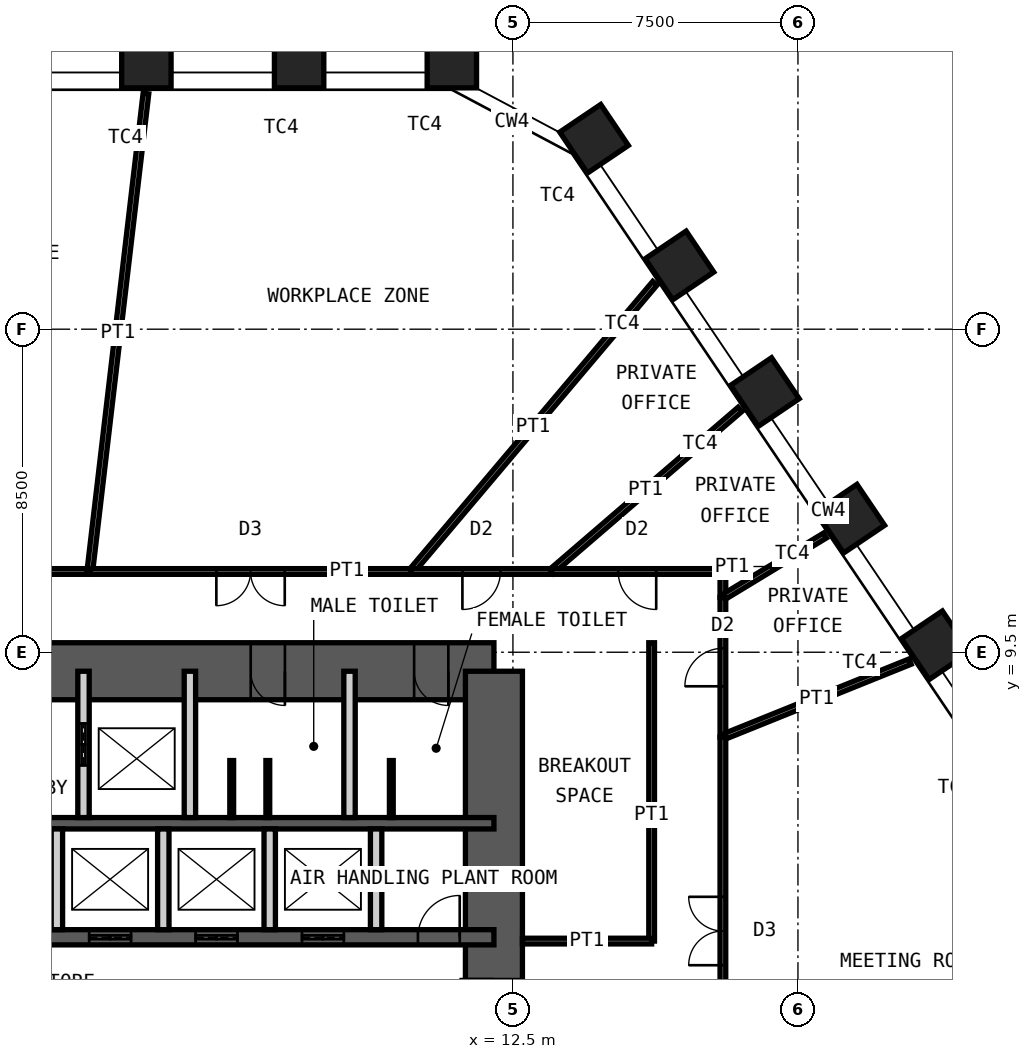
"""IFC4 building model, lengths in metres.
Left out: names, types, materials, properties, quantities, classifications, styles, units other than length and angle.
Written with IfcOpenShell. Run it as: python <this file> out.ifc"""

import sys

from ifc_helpers import new_model, si_unit, direction, frame, frame_2d, origin, origin_2d, place, context, subcontext, project, spatial, rectangle, hollow_rectangle, extrude, element, fill, save


model = new_model("IFC4")
c1 = context("Model", 3, precision=1e-05, world=origin(), true_north=direction((0.0, 1.0)))
c2 = subcontext(c1, "Body", "Model", "MODEL_VIEW")
j1 = project(units=[si_unit("LENGTHUNIT", "METRE"), si_unit("PLANEANGLEUNIT", "RADIAN")], contexts=[c1])
p1 = place(None, origin())
s1 = spatial("IfcSite", under=j1, at=p1, CompositionType="ELEMENT")
p2 = place(p1, origin())
s2 = spatial("IfcBuilding", under=s1, at=p2, CompositionType="ELEMENT")
p3 = place(p2, frame((0.0, 0.0, 153.4)))
s3 = spatial("IfcBuildingStorey", under=s2, at=p3, CompositionType="ELEMENT", Elevation=153.4)
for number, where, z_axis, x_axis in (
    (1, (2.854, 25.0, 0.0), (0.0, 0.0, 1.0), (-1.0, 0.0, 0.0)),
    (2, (6.874, 25.0, 0.0), (0.0, 0.0, 1.0), (-1.0, 0.0, 0.0)),
    (3, (10.893, 25.0, 0.0), (0.0, 0.0, 1.0), (-1.0, 0.0, 0.0)),
    (4, (14.635, 23.01, 0.0), (0.0, 0.0, 1.0), (-0.559, 0.829, 0.0)),
    (5, (16.882, 19.678, 0.0), (0.0, 0.0, 1.0), (-0.559, 0.829, 0.0)),
    (6, (19.13, 16.346, 0.0), (0.0, 0.0, 1.0), (-0.559, 0.829, 0.0)),
    (7, (21.377, 13.014, 0.0), (0.0, 0.0, 1.0), (-0.559, 0.829, 0.0)),
    (8, (23.625, 9.682, 0.0), (0.0, 0.0, 1.0), (-0.559, 0.829, 0.0)),
):
    element("IfcColumn", number, at=place(p3, frame(where, z_axis=z_axis, x_axis=x_axis)), inside=s3, PredefinedType="COLUMN", context=c2, shape_type="SweptSolid", body=[
        extrude(hollow_rectangle(XDim=1.3, YDim=1.3, WallThickness=0.1, at=origin_2d()), origin(), (0.0, 0.0, 1.0), 4.2),
    ])
p4 = place(p3, frame((-12.0, 9.0, 0.0), z_axis=(0.0, 0.0, 1.0), x_axis=(1.0, 0.0, 0.0)))
e9 = element("IfcWall", 9, at=p4, inside=s3, PredefinedType="SHEAR", context=c2, shape_type="SweptSolid", body=[
    extrude(rectangle(XDim=24.0, YDim=1.5, at=frame_2d((12.0, 0.0))), origin(), (0.0, 0.0, 1.0), 4.2),
])
p5 = place(p4, frame((10.4, 0.0, 0.0)))
e10 = element("IfcOpeningElement", 10, at=p5, cuts=e9, PredefinedType="OPENING", context=c2, shape_type="SweptSolid", body=[
    extrude(rectangle(XDim=1.0, YDim=2.1, at=frame_2d((0.5, 1.05))), frame((0.0, 0.76, 0.0), z_axis=(0.0, -1.0, 0.0), x_axis=(1.0, 0.0, 0.0)), (0.0, 0.0, 1.0), 1.52),
])
p6 = place(p4, frame((17.6, 0.0, 0.0)))
e11 = element("IfcOpeningElement", 11, at=p6, cuts=e9, PredefinedType="OPENING", context=c2, shape_type="SweptSolid", body=[
    extrude(rectangle(XDim=0.9, YDim=2.1, at=frame_2d((0.45, 1.05))), frame((0.0, 0.76, 0.0), z_axis=(0.0, -1.0, 0.0), x_axis=(1.0, 0.0, 0.0)), (0.0, 0.0, 1.0), 1.52),
])
p7 = place(p4, frame((21.9, 0.0, 0.0)))
e12 = element("IfcOpeningElement", 12, at=p7, cuts=e9, PredefinedType="OPENING", context=c2, shape_type="SweptSolid", body=[
    extrude(rectangle(XDim=0.9, YDim=2.1, at=frame_2d((0.45, 1.05))), frame((0.0, 0.76, 0.0), z_axis=(0.0, -1.0, 0.0), x_axis=(1.0, 0.0, 0.0)), (0.0, 0.0, 1.0), 1.52),
])
p8 = place(p3, frame((12.0, -9.0, 0.0), z_axis=(0.0, 0.0, 1.0), x_axis=(0.0, 1.0, 0.0)))
e13 = element("IfcWall", 13, at=p8, inside=s3, PredefinedType="SHEAR", context=c2, shape_type="SweptSolid", body=[
    extrude(rectangle(XDim=18.0, YDim=1.5, at=frame_2d((9.0, 0.0))), origin(), (0.0, 0.0, 1.0), 4.2),
])
p9 = place(p8, frame((8.1, 0.0, 0.0)))
e14 = element("IfcOpeningElement", 14, at=p9, cuts=e13, PredefinedType="OPENING", context=c2, shape_type="SweptSolid", body=[
    extrude(rectangle(XDim=1.8, YDim=2.1, at=frame_2d((0.9, 1.05))), frame((0.0, 0.76, 0.0), z_axis=(0.0, -1.0, 0.0), x_axis=(1.0, 0.0, 0.0)), (0.0, 0.0, 1.0), 1.52),
])
p10 = place(p3, frame((-12.0, 5.0, 0.0), z_axis=(0.0, 0.0, 1.0), x_axis=(1.0, 0.0, 0.0)))
e15 = element("IfcWall", 15, at=p10, inside=s3, PredefinedType="SHEAR", context=c2, shape_type="SweptSolid", body=[
    extrude(rectangle(XDim=24.0, YDim=0.3, at=frame_2d((12.0, 0.0))), origin(), (0.0, 0.0, 1.0), 4.2),
])
p11 = place(p3, frame((-12.0, 2.0, 0.0), z_axis=(0.0, 0.0, 1.0), x_axis=(1.0, 0.0, 0.0)))
e16 = element("IfcWall", 16, at=p11, inside=s3, PredefinedType="SHEAR", context=c2, shape_type="SweptSolid", body=[
    extrude(rectangle(XDim=24.0, YDim=0.4, at=frame_2d((12.0, 0.0))), origin(), (0.0, 0.0, 1.0), 4.2),
])
p12 = place(p11, frame((2.4, 0.0, 0.0)))
e17 = element("IfcOpeningElement", 17, at=p12, cuts=e16, PredefinedType="OPENING", context=c2, shape_type="SweptSolid", body=[
    extrude(rectangle(XDim=1.1, YDim=2.1, at=frame_2d((0.55, 1.05))), frame((0.0, 0.21, 0.0), z_axis=(0.0, -1.0, 0.0), x_axis=(1.0, 0.0, 0.0)), (0.0, 0.0, 1.0), 0.42),
])
p13 = place(p11, frame((22.0, 0.0, 0.0)))
e18 = element("IfcOpeningElement", 18, at=p13, cuts=e16, PredefinedType="OPENING", context=c2, shape_type="SweptSolid", body=[
    extrude(rectangle(XDim=1.1, YDim=2.1, at=frame_2d((0.55, 1.05))), frame((0.0, 0.21, 0.0), z_axis=(0.0, -1.0, 0.0), x_axis=(1.0, 0.0, 0.0)), (0.0, 0.0, 1.0), 0.42),
])
p14 = place(p11, frame((10.15, 0.0, 0.0)))
e19 = element("IfcOpeningElement", 19, at=p14, cuts=e16, PredefinedType="OPENING", context=c2, shape_type="SweptSolid", body=[
    extrude(rectangle(XDim=1.0, YDim=2.1, at=frame_2d((0.5, 1.05))), frame((0.0, 0.21, 0.0), z_axis=(0.0, -1.0, 0.0), x_axis=(1.0, 0.0, 0.0)), (0.0, 0.0, 1.0), 0.42),
])
p15 = place(p11, frame((6.9, 0.0, 0.0)))
e20 = element("IfcOpeningElement", 20, at=p15, cuts=e16, PredefinedType="OPENING", context=c2, shape_type="SweptSolid", body=[
    extrude(rectangle(XDim=1.0, YDim=2.1, at=frame_2d((0.5, 1.05))), frame((0.0, 0.21, 0.0), z_axis=(0.0, -1.0, 0.0), x_axis=(1.0, 0.0, 0.0)), (0.0, 0.0, 1.0), 0.42),
])
p16 = place(p11, frame((13.35, 0.0, 0.0)))
e21 = element("IfcOpeningElement", 21, at=p16, cuts=e16, PredefinedType="OPENING", context=c2, shape_type="SweptSolid", body=[
    extrude(rectangle(XDim=1.1, YDim=2.4, at=frame_2d((0.55, 1.2))), frame((0.0, 0.21, 0.0), z_axis=(0.0, -1.0, 0.0), x_axis=(1.0, 0.0, 0.0)), (0.0, 0.0, 1.0), 0.42),
])
p17 = place(p11, frame((16.15, 0.0, 0.0)))
e22 = element("IfcOpeningElement", 22, at=p17, cuts=e16, PredefinedType="OPENING", context=c2, shape_type="SweptSolid", body=[
    extrude(rectangle(XDim=1.1, YDim=2.4, at=frame_2d((0.55, 1.2))), frame((0.0, 0.21, 0.0), z_axis=(0.0, -1.0, 0.0), x_axis=(1.0, 0.0, 0.0)), (0.0, 0.0, 1.0), 0.42),
])
p18 = place(p11, frame((18.95, 0.0, 0.0)))
e23 = element("IfcOpeningElement", 23, at=p18, cuts=e16, PredefinedType="OPENING", context=c2, shape_type="SweptSolid", body=[
    extrude(rectangle(XDim=1.1, YDim=2.4, at=frame_2d((0.55, 1.2))), frame((0.0, 0.21, 0.0), z_axis=(0.0, -1.0, 0.0), x_axis=(1.0, 0.0, 0.0)), (0.0, 0.0, 1.0), 0.42),
])
p19 = place(p3, frame((1.2, 5.15, 0.0), z_axis=(0.0, 0.0, 1.0), x_axis=(0.0, 1.0, 0.0)))
e24 = element("IfcWall", 24, at=p19, inside=s3, PredefinedType="PARTITIONING", context=c2, shape_type="SweptSolid", body=[
    extrude(rectangle(XDim=3.85, YDim=0.3, at=frame_2d((1.925, 0.0))), origin(), (0.0, 0.0, 1.0), 3.98),
])
p20 = place(p19, frame((1.375, 0.0, 0.0)))
e25 = element("IfcOpeningElement", 25, at=p20, cuts=e24, PredefinedType="OPENING", context=c2, shape_type="SweptSolid", body=[
    extrude(rectangle(XDim=1.1, YDim=2.4, at=frame_2d((0.55, 1.2))), frame((0.0, 0.16, 0.0), z_axis=(0.0, -1.0, 0.0), x_axis=(1.0, 0.0, 0.0)), (0.0, 0.0, 1.0), 0.32),
])
for number, where, z_axis, x_axis in (
    (26, (4.0, 5.15, 0.0), (0.0, 0.0, 1.0), (0.0, 1.0, 0.0)),
    (27, (8.2, 5.15, 0.0), (0.0, 0.0, 1.0), (0.0, 1.0, 0.0)),
):
    element("IfcWall", number, at=place(p3, frame(where, z_axis=z_axis, x_axis=x_axis)), inside=s3, PredefinedType="PARTITIONING", context=c2, shape_type="SweptSolid", body=[
        extrude(rectangle(XDim=3.85, YDim=0.3, at=frame_2d((1.925, 0.0))), origin(), (0.0, 0.0, 1.0), 3.98),
    ])
for number, where, z_axis, x_axis in (
    (28, (0.5, 2.2, 0.0), (0.0, 0.0, 1.0), (0.0, 1.0, 0.0)),
    (29, (3.3, 2.2, 0.0), (0.0, 0.0, 1.0), (0.0, 1.0, 0.0)),
    (30, (6.1, 2.2, 0.0), (0.0, 0.0, 1.0), (0.0, 1.0, 0.0)),
    (31, (8.9, 2.2, 0.0), (0.0, 0.0, 1.0), (0.0, 1.0, 0.0)),
):
    element("IfcWall", number, at=place(p3, frame(where, z_axis=z_axis, x_axis=x_axis)), inside=s3, PredefinedType="PARTITIONING", context=c2, shape_type="SweptSolid", body=[
        extrude(rectangle(XDim=2.65, YDim=0.3, at=frame_2d((1.325, 0.0))), origin(), (0.0, 0.0, 1.0), 3.98),
    ])
for number, where, z_axis, x_axis in (
    (32, (5.1, 5.15, 0.0), (0.0, 0.0, 1.0), (0.0, 1.0, 0.0)),
    (33, (6.05, 5.15, 0.0), (0.0, 0.0, 1.0), (0.0, 1.0, 0.0)),
    (34, (9.3, 5.15, 0.0), (0.0, 0.0, 1.0), (0.0, 1.0, 0.0)),
):
    element("IfcWall", number, at=place(p3, frame(where, z_axis=z_axis, x_axis=x_axis)), inside=s3, PredefinedType="PARTITIONING", context=c2, shape_type="SweptSolid", body=[
        extrude(rectangle(XDim=1.5, YDim=0.1, at=frame_2d((0.75, 0.0))), origin(), (0.0, 0.0, 1.0), 2.1),
    ])
p21 = place(p3, frame((16.237, 19.21, 0.0), z_axis=(0.0, 0.0, 1.0), x_axis=(-0.645526723652, -0.763737683404, 0.0)))
e35 = element("IfcWall", 35, at=p21, inside=s3, PredefinedType="PARTITIONING", context=c2, shape_type="SweptSolid", body=[
    extrude(rectangle(XDim=9.932, YDim=0.15, at=frame_2d((4.966, 0.0))), origin(), (0.0, 0.0, 1.0), 3.33),
])
p22 = place(p3, frame((9.826, 11.625, 0.0), z_axis=(0.0, 0.0, 1.0), x_axis=(1.0, 0.0, 0.0)))
e36 = element("IfcWall", 36, at=p22, inside=s3, PredefinedType="PARTITIONING", context=c2, shape_type="SweptSolid", body=[
    extrude(rectangle(XDim=3.689, YDim=0.15, at=frame_2d((1.845, 0.0))), origin(), (0.0, 0.0, 1.0), 4.03),
])
p23 = place(p22, frame((1.345, 0.0, 0.0)))
e37 = element("IfcOpeningElement", 37, at=p23, cuts=e36, PredefinedType="OPENING", context=c2, shape_type="SweptSolid", body=[
    extrude(rectangle(XDim=1.0, YDim=2.4, at=frame_2d((0.5, 1.2))), frame((0.0, 0.085, 0.0), z_axis=(0.0, -1.0, 0.0), x_axis=(1.0, 0.0, 0.0)), (0.0, 0.0, 1.0), 0.17),
])
p24 = place(p3, frame((18.474, 15.89, 0.0), z_axis=(0.0, 0.0, 1.0), x_axis=(-0.758143486665, -0.65208776528, 0.0)))
e38 = element("IfcWall", 38, at=p24, inside=s3, PredefinedType="PARTITIONING", context=c2, shape_type="SweptSolid", body=[
    extrude(rectangle(XDim=6.54, YDim=0.15, at=frame_2d((3.27, 0.0))), origin(), (0.0, 0.0, 1.0), 3.33),
])
p25 = place(p3, frame((13.515, 11.625, 0.0), z_axis=(0.0, 0.0, 1.0), x_axis=(1.0, 0.0, 0.0)))
e39 = element("IfcWall", 39, at=p25, inside=s3, PredefinedType="PARTITIONING", context=c2, shape_type="SweptSolid", body=[
    extrude(rectangle(XDim=4.51, YDim=0.15, at=frame_2d((2.255, 0.0))), origin(), (0.0, 0.0, 1.0), 4.03),
])
p26 = place(p25, frame((1.755, 0.0, 0.0)))
e40 = element("IfcOpeningElement", 40, at=p26, cuts=e39, PredefinedType="OPENING", context=c2, shape_type="SweptSolid", body=[
    extrude(rectangle(XDim=1.0, YDim=2.4, at=frame_2d((0.5, 1.2))), frame((0.0, 0.085, 0.0), z_axis=(0.0, -1.0, 0.0), x_axis=(1.0, 0.0, 0.0)), (0.0, 0.0, 1.0), 0.17),
])
p27 = place(p3, frame((18.025, 11.625, 0.0), z_axis=(0.0, 0.0, 1.0), x_axis=(0.0, -1.0, 0.0)))
e41 = element("IfcWall", 41, at=p27, inside=s3, PredefinedType="PARTITIONING", context=c2, shape_type="SweptSolid", body=[
    extrude(rectangle(XDim=0.684, YDim=0.15, at=frame_2d((0.342, 0.0))), origin(), (0.0, 0.0, 1.0), 4.03),
])
p28 = place(p3, frame((20.711, 12.571, 0.0), z_axis=(0.0, 0.0, 1.0), x_axis=(-0.854890890653, -0.518807830587, 0.0)))
e42 = element("IfcWall", 42, at=p28, inside=s3, PredefinedType="PARTITIONING", context=c2, shape_type="SweptSolid", body=[
    extrude(rectangle(XDim=3.143, YDim=0.15, at=frame_2d((1.571, 0.0))), origin(), (0.0, 0.0, 1.0), 3.33),
])
p29 = place(p3, frame((18.025, 10.941, 0.0), z_axis=(0.0, 0.0, 1.0), x_axis=(0.0, -1.0, 0.0)))
e43 = element("IfcWall", 43, at=p29, inside=s3, PredefinedType="PARTITIONING", context=c2, shape_type="SweptSolid", body=[
    extrude(rectangle(XDim=3.673, YDim=0.15, at=frame_2d((1.837, 0.0))), origin(), (0.0, 0.0, 1.0), 4.03),
])
p30 = place(p29, frame((1.337, 0.0, 0.0)))
e44 = element("IfcOpeningElement", 44, at=p30, cuts=e43, PredefinedType="OPENING", context=c2, shape_type="SweptSolid", body=[
    extrude(rectangle(XDim=1.0, YDim=2.4, at=frame_2d((0.5, 1.2))), frame((0.0, 0.085, 0.0), z_axis=(0.0, -1.0, 0.0), x_axis=(1.0, 0.0, 0.0)), (0.0, 0.0, 1.0), 0.17),
])
p31 = place(p3, frame((22.951, 9.254, 0.0), z_axis=(0.0, 0.0, 1.0), x_axis=(-0.927452527427, -0.37394091695, 0.0)))
e45 = element("IfcWall", 45, at=p31, inside=s3, PredefinedType="PARTITIONING", context=c2, shape_type="SweptSolid", body=[
    extrude(rectangle(XDim=5.312, YDim=0.15, at=frame_2d((2.656, 0.0))), origin(), (0.0, 0.0, 1.0), 3.33),
])
p32 = place(p3, frame((18.025, 7.267, 0.0), z_axis=(0.0, 0.0, 1.0), x_axis=(0.0, -1.0, 0.0)))
e46 = element("IfcWall", 46, at=p32, inside=s3, PredefinedType="PARTITIONING", context=c2, shape_type="SweptSolid", body=[
    extrude(rectangle(XDim=10.205, YDim=0.15, at=frame_2d((5.103, 0.0))), origin(), (0.0, 0.0, 1.0), 4.03),
])
p33 = place(p32, frame((4.203, 0.0, 0.0)))
e47 = element("IfcOpeningElement", 47, at=p33, cuts=e46, PredefinedType="OPENING", context=c2, shape_type="SweptSolid", body=[
    extrude(rectangle(XDim=1.8, YDim=2.4, at=frame_2d((0.9, 1.2))), frame((0.0, 0.085, 0.0), z_axis=(0.0, -1.0, 0.0), x_axis=(1.0, 0.0, 0.0)), (0.0, 0.0, 1.0), 0.17),
])
p34 = place(p3, frame((-4.403, 11.625, 0.0), z_axis=(0.0, 0.0, 1.0), x_axis=(1.0, 0.0, 0.0)))
e48 = element("IfcWall", 48, at=p34, inside=s3, PredefinedType="PARTITIONING", context=c2, shape_type="SweptSolid", body=[
    extrude(rectangle(XDim=5.768, YDim=0.15, at=frame_2d((2.884, 0.0))), origin(), (0.0, 0.0, 1.0), 4.03),
])
p35 = place(p34, frame((1.984, 0.0, 0.0)))
e49 = element("IfcOpeningElement", 49, at=p35, cuts=e48, PredefinedType="OPENING", context=c2, shape_type="SweptSolid", body=[
    extrude(rectangle(XDim=1.8, YDim=2.4, at=frame_2d((0.9, 1.2))), frame((0.0, 0.085, 0.0), z_axis=(0.0, -1.0, 0.0), x_axis=(1.0, 0.0, 0.0)), (0.0, 0.0, 1.0), 0.17),
])
p36 = place(p3, frame((2.843, 24.201, 0.0), z_axis=(0.0, 0.0, 1.0), x_axis=(-0.116670084723, -0.993170726175, 0.0)))
e50 = element("IfcWall", 50, at=p36, inside=s3, PredefinedType="PARTITIONING", context=c2, shape_type="SweptSolid", body=[
    extrude(rectangle(XDim=12.662, YDim=0.15, at=frame_2d((6.331, 0.0))), origin(), (0.0, 0.0, 1.0), 3.33),
])
p37 = place(p3, frame((1.366, 11.625, 0.0), z_axis=(0.0, 0.0, 1.0), x_axis=(1.0, 0.0, 0.0)))
e51 = element("IfcWall", 51, at=p37, inside=s3, PredefinedType="PARTITIONING", context=c2, shape_type="SweptSolid", body=[
    extrude(rectangle(XDim=8.46, YDim=0.15, at=frame_2d((4.23, 0.0))), origin(), (0.0, 0.0, 1.0), 4.03),
])
p38 = place(p37, frame((3.33, 0.0, 0.0)))
e52 = element("IfcOpeningElement", 52, at=p38, cuts=e51, PredefinedType="OPENING", context=c2, shape_type="SweptSolid", body=[
    extrude(rectangle(XDim=1.8, YDim=2.4, at=frame_2d((0.9, 1.2))), frame((0.0, 0.085, 0.0), z_axis=(0.0, -1.0, 0.0), x_axis=(1.0, 0.0, 0.0)), (0.0, 0.0, 1.0), 0.17),
])
p39 = place(p3, frame((16.15, 1.9, 0.0), z_axis=(0.0, 0.0, 1.0), x_axis=(0.0, 1.0, 0.0)))
e53 = element("IfcWall", 53, at=p39, inside=s3, PredefinedType="PARTITIONING", context=c2, shape_type="SweptSolid", body=[
    extrude(rectangle(XDim=7.85, YDim=0.15, at=frame_2d((3.925, 0.0))), origin(), (0.0, 0.0, 1.0), 4.03),
])
p40 = place(p3, frame((12.75, 1.9, 0.0), z_axis=(0.0, 0.0, 1.0), x_axis=(1.0, 0.0, 0.0)))
e54 = element("IfcWall", 54, at=p40, inside=s3, PredefinedType="PARTITIONING", context=c2, shape_type="SweptSolid", body=[
    extrude(rectangle(XDim=3.4, YDim=0.15, at=frame_2d((1.7, 0.0))), origin(), (0.0, 0.0, 1.0), 2.93),
])
p41 = place(p6, origin())
e55 = element("IfcDoor", 55, at=p41, inside=s3, OperationType="SINGLE_SWING_RIGHT", PredefinedType="DOOR", context=c2, shape_type="SweptSolid", body=[
    extrude(rectangle(XDim=0.9, YDim=2.1, at=frame_2d((0.45, 1.05))), frame((0.0, 0.025, 0.0), z_axis=(0.0, -1.0, 0.0), x_axis=(1.0, 0.0, 0.0)), (0.0, 0.0, 1.0), 0.05),
])
fill(e11, e55)
p42 = place(p7, origin())
e56 = element("IfcDoor", 56, at=p42, inside=s3, OperationType="SINGLE_SWING_RIGHT", PredefinedType="DOOR", context=c2, shape_type="SweptSolid", body=[
    extrude(rectangle(XDim=0.9, YDim=2.1, at=frame_2d((0.45, 1.05))), frame((0.0, 0.025, 0.0), z_axis=(0.0, -1.0, 0.0), x_axis=(1.0, 0.0, 0.0)), (0.0, 0.0, 1.0), 0.05),
])
fill(e12, e56)
p43 = place(p13, origin())
e57 = element("IfcDoor", 57, at=p43, inside=s3, OperationType="SINGLE_SWING_LEFT", PredefinedType="DOOR", context=c2, shape_type="SweptSolid", body=[
    extrude(rectangle(XDim=1.1, YDim=2.1, at=frame_2d((0.55, 1.05))), frame((0.0, 0.025, 0.0), z_axis=(0.0, -1.0, 0.0), x_axis=(1.0, 0.0, 0.0)), (0.0, 0.0, 1.0), 0.05),
])
fill(e18, e57)
p44 = place(p9, origin())
e58 = element("IfcDoor", 58, at=p44, inside=s3, OperationType="DOUBLE_DOOR_DOUBLE_SWING", PredefinedType="DOOR", context=c2, shape_type="SweptSolid", body=[
    extrude(rectangle(XDim=1.8, YDim=2.1, at=frame_2d((0.9, 1.05))), frame((0.0, 0.025, 0.0), z_axis=(0.0, -1.0, 0.0), x_axis=(1.0, 0.0, 0.0)), (0.0, 0.0, 1.0), 0.05),
])
fill(e14, e58)
p45 = place(p20, origin())
e59 = element("IfcDoor", 59, at=p45, inside=s3, OperationType="DOUBLE_DOOR_SLIDING", PredefinedType="DOOR", context=c2, shape_type="SweptSolid", body=[
    extrude(rectangle(XDim=1.1, YDim=2.4, at=frame_2d((0.55, 1.2))), frame((0.0, 0.025, 0.0), z_axis=(0.0, -1.0, 0.0), x_axis=(1.0, 0.0, 0.0)), (0.0, 0.0, 1.0), 0.05),
])
fill(e25, e59)
p46 = place(p16, origin())
e60 = element("IfcDoor", 60, at=p46, inside=s3, OperationType="DOUBLE_DOOR_SLIDING", PredefinedType="DOOR", context=c2, shape_type="SweptSolid", body=[
    extrude(rectangle(XDim=1.1, YDim=2.4, at=frame_2d((0.55, 1.2))), frame((0.0, 0.025, 0.0), z_axis=(0.0, -1.0, 0.0), x_axis=(1.0, 0.0, 0.0)), (0.0, 0.0, 1.0), 0.05),
])
fill(e21, e60)
p47 = place(p17, origin())
e61 = element("IfcDoor", 61, at=p47, inside=s3, OperationType="DOUBLE_DOOR_SLIDING", PredefinedType="DOOR", context=c2, shape_type="SweptSolid", body=[
    extrude(rectangle(XDim=1.1, YDim=2.4, at=frame_2d((0.55, 1.2))), frame((0.0, 0.025, 0.0), z_axis=(0.0, -1.0, 0.0), x_axis=(1.0, 0.0, 0.0)), (0.0, 0.0, 1.0), 0.05),
])
fill(e22, e61)
p48 = place(p18, origin())
e62 = element("IfcDoor", 62, at=p48, inside=s3, OperationType="DOUBLE_DOOR_SLIDING", PredefinedType="DOOR", context=c2, shape_type="SweptSolid", body=[
    extrude(rectangle(XDim=1.1, YDim=2.4, at=frame_2d((0.55, 1.2))), frame((0.0, 0.025, 0.0), z_axis=(0.0, -1.0, 0.0), x_axis=(1.0, 0.0, 0.0)), (0.0, 0.0, 1.0), 0.05),
])
fill(e23, e62)
p49 = place(p23, origin())
e63 = element("IfcDoor", 63, at=p49, inside=s3, OperationType="SINGLE_SWING_LEFT", PredefinedType="DOOR", context=c2, shape_type="SweptSolid", body=[
    extrude(rectangle(XDim=1.0, YDim=2.4, at=frame_2d((0.5, 1.2))), frame((0.0, 0.025, 0.0), z_axis=(0.0, -1.0, 0.0), x_axis=(1.0, 0.0, 0.0)), (0.0, 0.0, 1.0), 0.05),
])
fill(e37, e63)
p50 = place(p26, origin())
e64 = element("IfcDoor", 64, at=p50, inside=s3, OperationType="SINGLE_SWING_RIGHT", PredefinedType="DOOR", context=c2, shape_type="SweptSolid", body=[
    extrude(rectangle(XDim=1.0, YDim=2.4, at=frame_2d((0.5, 1.2))), frame((0.0, 0.025, 0.0), z_axis=(0.0, -1.0, 0.0), x_axis=(1.0, 0.0, 0.0)), (0.0, 0.0, 1.0), 0.05),
])
fill(e40, e64)
p51 = place(p30, origin())
e65 = element("IfcDoor", 65, at=p51, inside=s3, OperationType="SINGLE_SWING_RIGHT", PredefinedType="DOOR", context=c2, shape_type="SweptSolid", body=[
    extrude(rectangle(XDim=1.0, YDim=2.4, at=frame_2d((0.5, 1.2))), frame((0.0, 0.025, 0.0), z_axis=(0.0, -1.0, 0.0), x_axis=(1.0, 0.0, 0.0)), (0.0, 0.0, 1.0), 0.05),
])
fill(e44, e65)
p52 = place(p33, origin())
e66 = element("IfcDoor", 66, at=p52, inside=s3, OperationType="DOUBLE_DOOR_DOUBLE_SWING", PredefinedType="DOOR", context=c2, shape_type="SweptSolid", body=[
    extrude(rectangle(XDim=1.8, YDim=2.4, at=frame_2d((0.9, 1.2))), frame((0.0, 0.025, 0.0), z_axis=(0.0, -1.0, 0.0), x_axis=(1.0, 0.0, 0.0)), (0.0, 0.0, 1.0), 0.05),
])
fill(e47, e66)
p53 = place(p38, origin())
e67 = element("IfcDoor", 67, at=p53, inside=s3, OperationType="DOUBLE_DOOR_DOUBLE_SWING", PredefinedType="DOOR", context=c2, shape_type="SweptSolid", body=[
    extrude(rectangle(XDim=1.8, YDim=2.4, at=frame_2d((0.9, 1.2))), frame((0.0, 0.025, 0.0), z_axis=(0.0, -1.0, 0.0), x_axis=(1.0, 0.0, 0.0)), (0.0, 0.0, 1.0), 0.05),
])
fill(e52, e67)
save(model, sys.argv[1])
